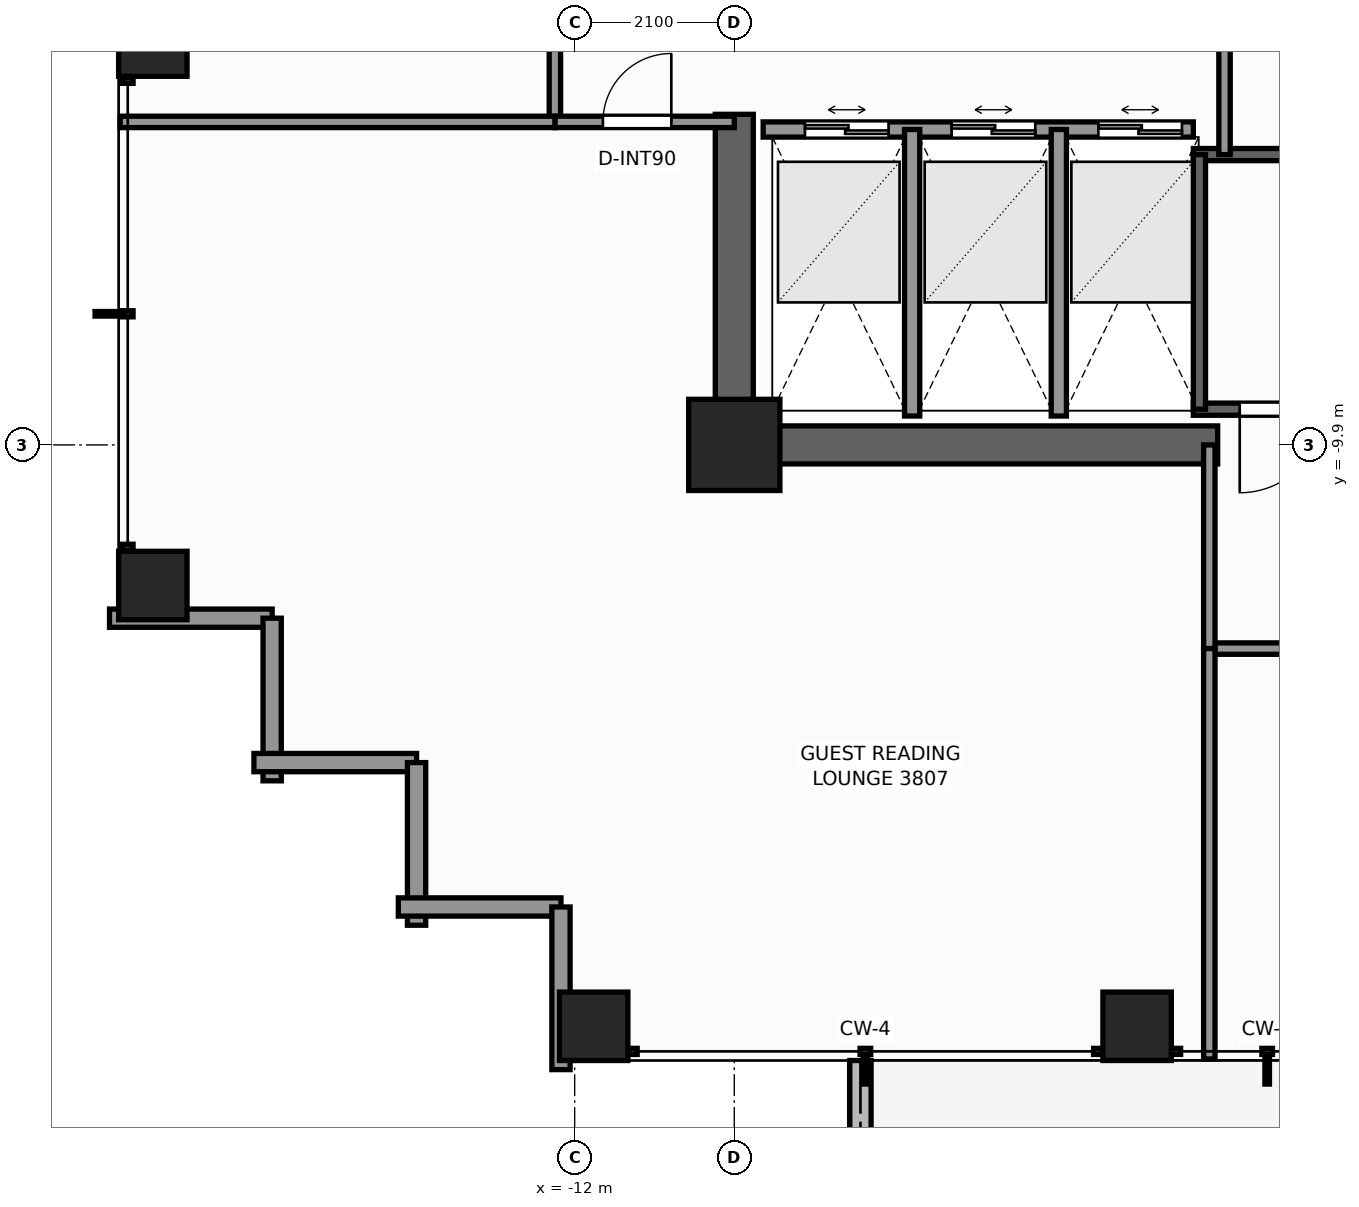
"""IFC4 building model, lengths in metres.
Left out: names, types, materials, properties, quantities, classifications, styles, units other than length and angle.
Written with IfcOpenShell. Run it as: python <this file> out.ifc"""

import sys

from ifc_helpers import new_model, si_unit, direction, frame, frame_2d, origin, origin_2d, place, context, subcontext, project, spatial, rectangle, extrude, element, fill, save


model = new_model("IFC4")
c1 = context("Model", 3, precision=1e-05, world=origin(), true_north=direction((0.0, 1.0)))
c2 = subcontext(c1, "Body", "Model", "MODEL_VIEW")
j1 = project(units=[si_unit("LENGTHUNIT", "METRE"), si_unit("PLANEANGLEUNIT", "RADIAN")], contexts=[c1])
p1 = place(None, origin())
s1 = spatial("IfcSite", under=j1, at=p1, CompositionType="ELEMENT")
p2 = place(p1, origin())
s2 = spatial("IfcBuilding", under=s1, at=p2, CompositionType="ELEMENT")
p3 = place(p2, frame((0.0, 0.0, 131.6)))
s3 = spatial("IfcBuildingStorey", under=s2, at=p3, CompositionType="ELEMENT", Elevation=131.6)
p4 = place(p3, frame((-3.54, -9.9, 0.0), z_axis=(0.0, 0.0, 1.0), x_axis=(-1.0, 0.0, 0.0)))
e1 = element("IfcWall", 1, at=p4, inside=s3, PredefinedType="SHEAR", context=c2, shape_type="SweptSolid", body=[
    extrude(rectangle(XDim=6.61, YDim=0.5, at=frame_2d((3.305, 0.0))), origin(), (0.0, 0.0, 1.0), 3.3),
])
p5 = place(p3, frame((-9.9, -9.65, 0.0), z_axis=(0.0, 0.0, 1.0), x_axis=(0.0, 1.0, 0.0)))
e2 = element("IfcWall", 2, at=p5, inside=s3, PredefinedType="SHEAR", context=c2, shape_type="SweptSolid", body=[
    extrude(rectangle(XDim=4.1, YDim=0.5, at=frame_2d((2.05, 0.0))), origin(), (0.0, 0.0, 1.0), 3.3),
])
p6 = place(p3, frame((-9.9, -9.9, 0.0), z_axis=(0.0, 0.0, 1.0), x_axis=(1.0, 0.0, 0.0)))
e3 = element("IfcColumn", 3, at=p6, inside=s3, PredefinedType="COLUMN", context=c2, shape_type="SweptSolid", body=[
    extrude(rectangle(XDim=1.2, YDim=1.2, at=origin_2d()), origin(), (0.0, 0.0, 1.0), 3.3),
])
for number, where, z_axis, x_axis in (
    (4, (-11.75, -17.55, 0.0), (0.0, 0.0, 1.0), (1.0, 0.0, 0.0)),
    (5, (-4.6, -17.55, 0.0), (0.0, 0.0, 1.0), (1.0, 0.0, 0.0)),
    (6, (-17.55, -11.75, 0.0), (0.0, 0.0, 1.0), (1.0, 0.0, 0.0)),
    (7, (-17.55, -4.6, 0.0), (0.0, 0.0, 1.0), (1.0, 0.0, 0.0)),
):
    element("IfcColumn", number, at=place(p3, frame(where, z_axis=z_axis, x_axis=x_axis)), inside=s3, PredefinedType="COLUMN", context=c2, shape_type="SweptSolid", body=[
        extrude(rectangle(XDim=0.9, YDim=0.9, at=origin_2d()), origin(), (0.0, 0.0, 1.0), 3.3),
    ])
p7 = place(p3, frame((-8.24, -18.0, -0.02), z_axis=(0.0, 0.0, 1.0), x_axis=(0.0, -1.0, 0.0)))
e8 = element("IfcWall", 8, at=p7, inside=s3, PredefinedType="PARAPET", context=c2, shape_type="SweptSolid", body=[
    extrude(rectangle(XDim=1.466, YDim=0.28, at=frame_2d((0.733, 0.0))), origin(), (0.0, 0.0, 1.0), 0.42),
])
for number, where, z_axis, x_axis in (
    (9, (-15.98, -12.18, 0.0), (0.0, 0.0, 1.0), (-1.0, 0.0, 0.0)),
    (10, (-15.98, -14.32, 0.0), (0.0, 0.0, 1.0), (0.0, 1.0, 0.0)),
):
    element("IfcWall", number, at=place(p3, frame(where, z_axis=z_axis, x_axis=x_axis)), inside=s3, PredefinedType="STANDARD", context=c2, shape_type="SweptSolid", body=[
        extrude(rectangle(XDim=2.14, YDim=0.24, at=frame_2d((1.07, 0.0))), origin(), (0.0, 0.0, 1.0), 2.479),
    ])
for number, where, z_axis, x_axis in (
    (11, (-14.08, -14.08, 0.0), (0.0, 0.0, 1.0), (-1.0, 0.0, 0.0)),
    (12, (-14.08, -16.22, 0.0), (0.0, 0.0, 1.0), (0.0, 1.0, 0.0)),
):
    element("IfcWall", number, at=place(p3, frame(where, z_axis=z_axis, x_axis=x_axis)), inside=s3, PredefinedType="STANDARD", context=c2, shape_type="SweptSolid", body=[
        extrude(rectangle(XDim=2.14, YDim=0.24, at=frame_2d((1.07, 0.0))), origin(), (0.0, 0.0, 1.0), 2.479),
    ])
for number, where, z_axis, x_axis in (
    (13, (-12.18, -15.98, 0.0), (0.0, 0.0, 1.0), (-1.0, 0.0, 0.0)),
    (14, (-12.18, -18.12, 0.0), (0.0, 0.0, 1.0), (0.0, 1.0, 0.0)),
):
    element("IfcWall", number, at=place(p3, frame(where, z_axis=z_axis, x_axis=x_axis)), inside=s3, PredefinedType="STANDARD", context=c2, shape_type="SweptSolid", body=[
        extrude(rectangle(XDim=2.14, YDim=0.24, at=frame_2d((1.07, 0.0))), origin(), (0.0, 0.0, 1.0), 2.479),
    ])
p8 = place(p3, frame((3.86, -9.43, 0.0), z_axis=(0.0, 0.0, 1.0), x_axis=(-1.0, 0.0, 0.0)))
e15 = element("IfcWall", 15, at=p8, inside=s3, PredefinedType="SHEAR", context=c2, shape_type="SweptSolid", body=[
    extrude(rectangle(XDim=7.72, YDim=0.16, at=frame_2d((3.86, 0.0))), origin(), (0.0, 0.0, 1.0), 3.3),
])
p9 = place(p8, frame((6.01, 0.0, 0.0)))
e16 = element("IfcOpeningElement", 16, at=p9, cuts=e15, PredefinedType="OPENING", context=c2, shape_type="SweptSolid", body=[
    extrude(rectangle(XDim=1.1, YDim=2.2, at=frame_2d((0.55, 1.1))), frame((0.0, 0.09, 0.0), z_axis=(0.0, -1.0, 0.0), x_axis=(1.0, 0.0, 0.0)), (0.0, 0.0, 1.0), 0.18),
])
p10 = place(p3, frame((-3.86, -6.08, 0.0), z_axis=(0.0, 0.0, 1.0), x_axis=(1.0, 0.0, 0.0)))
e17 = element("IfcWall", 17, at=p10, inside=s3, PredefinedType="SHEAR", context=c2, shape_type="SweptSolid", body=[
    extrude(rectangle(XDim=7.72, YDim=0.16, at=frame_2d((3.86, 0.0))), origin(), (0.0, 0.0, 1.0), 3.3),
])
p11 = place(p3, frame((-3.78, -9.43, 0.0), z_axis=(0.0, 0.0, 1.0), x_axis=(0.0, 1.0, 0.0)))
e18 = element("IfcWall", 18, at=p11, inside=s3, PredefinedType="SHEAR", context=c2, shape_type="SweptSolid", body=[
    extrude(rectangle(XDim=3.35, YDim=0.16, at=frame_2d((1.675, 0.0))), origin(), (0.0, 0.0, 1.0), 3.3),
])
p12 = place(p3, frame((-9.52, -5.75, 0.0), z_axis=(0.0, 0.0, 1.0), x_axis=(1.0, 0.0, 0.0)))
e19 = element("IfcWall", 19, at=p12, inside=s3, PredefinedType="SOLIDWALL", context=c2, shape_type="SweptSolid", body=[
    extrude(rectangle(XDim=5.66, YDim=0.2, at=frame_2d((2.83, 0.0))), origin(), (0.0, 0.0, 1.0), 3.1),
])
p13 = place(p12, frame((0.55, 0.0, 0.0)))
e20 = element("IfcOpeningElement", 20, at=p13, cuts=e19, PredefinedType="OPENING", context=c2, shape_type="SweptSolid", body=[
    extrude(rectangle(XDim=1.1, YDim=2.2, at=frame_2d((0.55, 1.1))), frame((0.0, 0.11, 0.0), z_axis=(0.0, -1.0, 0.0), x_axis=(1.0, 0.0, 0.0)), (0.0, 0.0, 1.0), 0.22),
])
p14 = place(p12, frame((2.48, 0.0, 0.0)))
e21 = element("IfcOpeningElement", 21, at=p14, cuts=e19, PredefinedType="OPENING", context=c2, shape_type="SweptSolid", body=[
    extrude(rectangle(XDim=1.1, YDim=2.2, at=frame_2d((0.55, 1.1))), frame((0.0, 0.11, 0.0), z_axis=(0.0, -1.0, 0.0), x_axis=(1.0, 0.0, 0.0)), (0.0, 0.0, 1.0), 0.22),
])
p15 = place(p12, frame((4.41, 0.0, 0.0)))
e22 = element("IfcOpeningElement", 22, at=p15, cuts=e19, PredefinedType="OPENING", context=c2, shape_type="SweptSolid", body=[
    extrude(rectangle(XDim=1.1, YDim=2.2, at=frame_2d((0.55, 1.1))), frame((0.0, 0.11, 0.0), z_axis=(0.0, -1.0, 0.0), x_axis=(1.0, 0.0, 0.0)), (0.0, 0.0, 1.0), 0.22),
])
for number, where, z_axis, x_axis in (
    (23, (-7.56, -9.52, 0.0), (0.0, 0.0, 1.0), (0.0, 1.0, 0.0)),
    (24, (-5.63, -9.52, 0.0), (0.0, 0.0, 1.0), (0.0, 1.0, 0.0)),
):
    element("IfcWall", number, at=place(p3, frame(where, z_axis=z_axis, x_axis=x_axis)), inside=s3, PredefinedType="SOLIDWALL", context=c2, shape_type="SweptSolid", body=[
        extrude(rectangle(XDim=3.77, YDim=0.2, at=frame_2d((1.885, 0.0))), origin(), (0.0, 0.0, 1.0), 3.1),
    ])
p16 = place(p3, frame((-3.45, -6.08, 0.0), z_axis=(0.0, 0.0, 1.0), x_axis=(0.0, 1.0, 0.0)))
e25 = element("IfcWall", 25, at=p16, inside=s3, PredefinedType="PARTITIONING", context=c2, shape_type="SweptSolid", body=[
    extrude(rectangle(XDim=2.36, YDim=0.15, at=frame_2d((1.18, 0.0))), origin(), (0.0, 0.0, 1.0), 3.1),
])
p17 = place(p3, frame((-3.65, -12.58, 0.0), z_axis=(0.0, 0.0, 1.0), x_axis=(1.0, 0.0, 0.0)))
e26 = element("IfcWall", 26, at=p17, inside=s3, PredefinedType="PARTITIONING", context=c2, shape_type="SweptSolid", body=[
    extrude(rectangle(XDim=16.07, YDim=0.15, at=frame_2d((8.035, 0.0))), origin(), (0.0, 0.0, 1.0), 2.312),
])
p18 = place(p17, frame((10.735, 0.0, 0.0)))
e27 = element("IfcOpeningElement", 27, at=p18, cuts=e26, PredefinedType="OPENING", context=c2, shape_type="SweptSolid", body=[
    extrude(rectangle(XDim=0.9, YDim=2.06, at=frame_2d((0.45, 1.03))), frame((0.0, 0.085, 0.0), z_axis=(0.0, -1.0, 0.0), x_axis=(1.0, 0.0, 0.0)), (0.0, 0.0, 1.0), 0.17),
])
p19 = place(p3, frame((-3.65, -12.58, 0.0), z_axis=(0.0, 0.0, 1.0), x_axis=(0.0, 1.0, 0.0)))
e28 = element("IfcWall", 28, at=p19, inside=s3, PredefinedType="PARTITIONING", context=c2, shape_type="SweptSolid", body=[
    extrude(rectangle(XDim=2.68, YDim=0.15, at=frame_2d((1.34, 0.0))), origin(), (0.0, 0.0, 1.0), 3.1),
])
p20 = place(p3, frame((-12.26, -5.65, 0.0), z_axis=(0.0, 0.0, 1.0), x_axis=(0.0, 1.0, 0.0)))
e29 = element("IfcWall", 29, at=p20, inside=s3, PredefinedType="PARTITIONING", context=c2, shape_type="SweptSolid", body=[
    extrude(rectangle(XDim=3.6, YDim=0.15, at=frame_2d((1.8, 0.0))), origin(), (0.0, 0.0, 1.0), 2.312),
])
p21 = place(p20, frame((2.156, 0.0, 0.0)))
e30 = element("IfcOpeningElement", 30, at=p21, cuts=e29, PredefinedType="OPENING", context=c2, shape_type="SweptSolid", body=[
    extrude(rectangle(XDim=0.9, YDim=2.06, at=frame_2d((0.45, 1.03))), frame((0.0, 0.085, 0.0), z_axis=(0.0, -1.0, 0.0), x_axis=(1.0, 0.0, 0.0)), (0.0, 0.0, 1.0), 0.17),
])
p22 = place(p3, frame((-12.26, -5.65, 0.0), z_axis=(0.0, 0.0, 1.0), x_axis=(1.0, 0.0, 0.0)))
e31 = element("IfcWall", 31, at=p22, inside=s3, PredefinedType="PARTITIONING", context=c2, shape_type="SweptSolid", body=[
    extrude(rectangle(XDim=2.36, YDim=0.15, at=frame_2d((1.18, 0.0))), origin(), (0.0, 0.0, 1.0), 3.1),
])
p23 = place(p22, frame((0.632, 0.0, 0.0)))
e32 = element("IfcOpeningElement", 32, at=p23, cuts=e31, PredefinedType="OPENING", context=c2, shape_type="SweptSolid", body=[
    extrude(rectangle(XDim=0.9, YDim=2.06, at=frame_2d((0.45, 1.03))), frame((0.0, 0.085, 0.0), z_axis=(0.0, -1.0, 0.0), x_axis=(1.0, 0.0, 0.0)), (0.0, 0.0, 1.0), 0.17),
])
p24 = place(p3, frame((-17.98, -5.65, 0.0), z_axis=(0.0, 0.0, 1.0), x_axis=(1.0, 0.0, 0.0)))
e33 = element("IfcWall", 33, at=p24, inside=s3, PredefinedType="PARTITIONING", context=c2, shape_type="SweptSolid", body=[
    extrude(rectangle(XDim=5.72, YDim=0.15, at=frame_2d((2.86, 0.0))), origin(), (0.0, 0.0, 1.0), 2.469),
])
p25 = place(p3, frame((-3.65, -17.98, 0.0), z_axis=(0.0, 0.0, 1.0), x_axis=(0.0, 1.0, 0.0)))
e34 = element("IfcWall", 34, at=p25, inside=s3, PredefinedType="PARTITIONING", context=c2, shape_type="SweptSolid", body=[
    extrude(rectangle(XDim=5.4, YDim=0.15, at=frame_2d((2.7, 0.0))), origin(), (0.0, 0.0, 1.0), 2.469),
])
p26 = place(p9, origin())
e35 = element("IfcDoor", 35, at=p26, inside=s3, OperationType="SINGLE_SWING_RIGHT", PredefinedType="DOOR", context=c2, shape_type="SweptSolid", body=[
    extrude(rectangle(XDim=1.1, YDim=2.2, at=frame_2d((0.55, 1.1))), frame((0.0, 0.025, 0.0), z_axis=(0.0, -1.0, 0.0), x_axis=(1.0, 0.0, 0.0)), (0.0, 0.0, 1.0), 0.05),
])
fill(e16, e35)
p27 = place(p13, origin())
e36 = element("IfcDoor", 36, at=p27, inside=s3, OperationType="DOUBLE_DOOR_SLIDING", PredefinedType="DOOR", context=c2, shape_type="SweptSolid", body=[
    extrude(rectangle(XDim=1.1, YDim=2.2, at=frame_2d((0.55, 1.1))), frame((0.0, 0.025, 0.0), z_axis=(0.0, -1.0, 0.0), x_axis=(1.0, 0.0, 0.0)), (0.0, 0.0, 1.0), 0.05),
])
fill(e20, e36)
p28 = place(p14, origin())
e37 = element("IfcDoor", 37, at=p28, inside=s3, OperationType="DOUBLE_DOOR_SLIDING", PredefinedType="DOOR", context=c2, shape_type="SweptSolid", body=[
    extrude(rectangle(XDim=1.1, YDim=2.2, at=frame_2d((0.55, 1.1))), frame((0.0, 0.025, 0.0), z_axis=(0.0, -1.0, 0.0), x_axis=(1.0, 0.0, 0.0)), (0.0, 0.0, 1.0), 0.05),
])
fill(e21, e37)
p29 = place(p15, origin())
e38 = element("IfcDoor", 38, at=p29, inside=s3, OperationType="DOUBLE_DOOR_SLIDING", PredefinedType="DOOR", context=c2, shape_type="SweptSolid", body=[
    extrude(rectangle(XDim=1.1, YDim=2.2, at=frame_2d((0.55, 1.1))), frame((0.0, 0.025, 0.0), z_axis=(0.0, -1.0, 0.0), x_axis=(1.0, 0.0, 0.0)), (0.0, 0.0, 1.0), 0.05),
])
fill(e22, e38)
p30 = place(p23, origin())
e39 = element("IfcDoor", 39, at=p30, inside=s3, OperationType="SINGLE_SWING_RIGHT", PredefinedType="DOOR", context=c2, shape_type="SweptSolid", body=[
    extrude(rectangle(XDim=0.9, YDim=2.06, at=frame_2d((0.45, 1.03))), frame((0.0, 0.025, 0.0), z_axis=(0.0, -1.0, 0.0), x_axis=(1.0, 0.0, 0.0)), (0.0, 0.0, 1.0), 0.05),
])
fill(e32, e39)
save(model, sys.argv[1])
